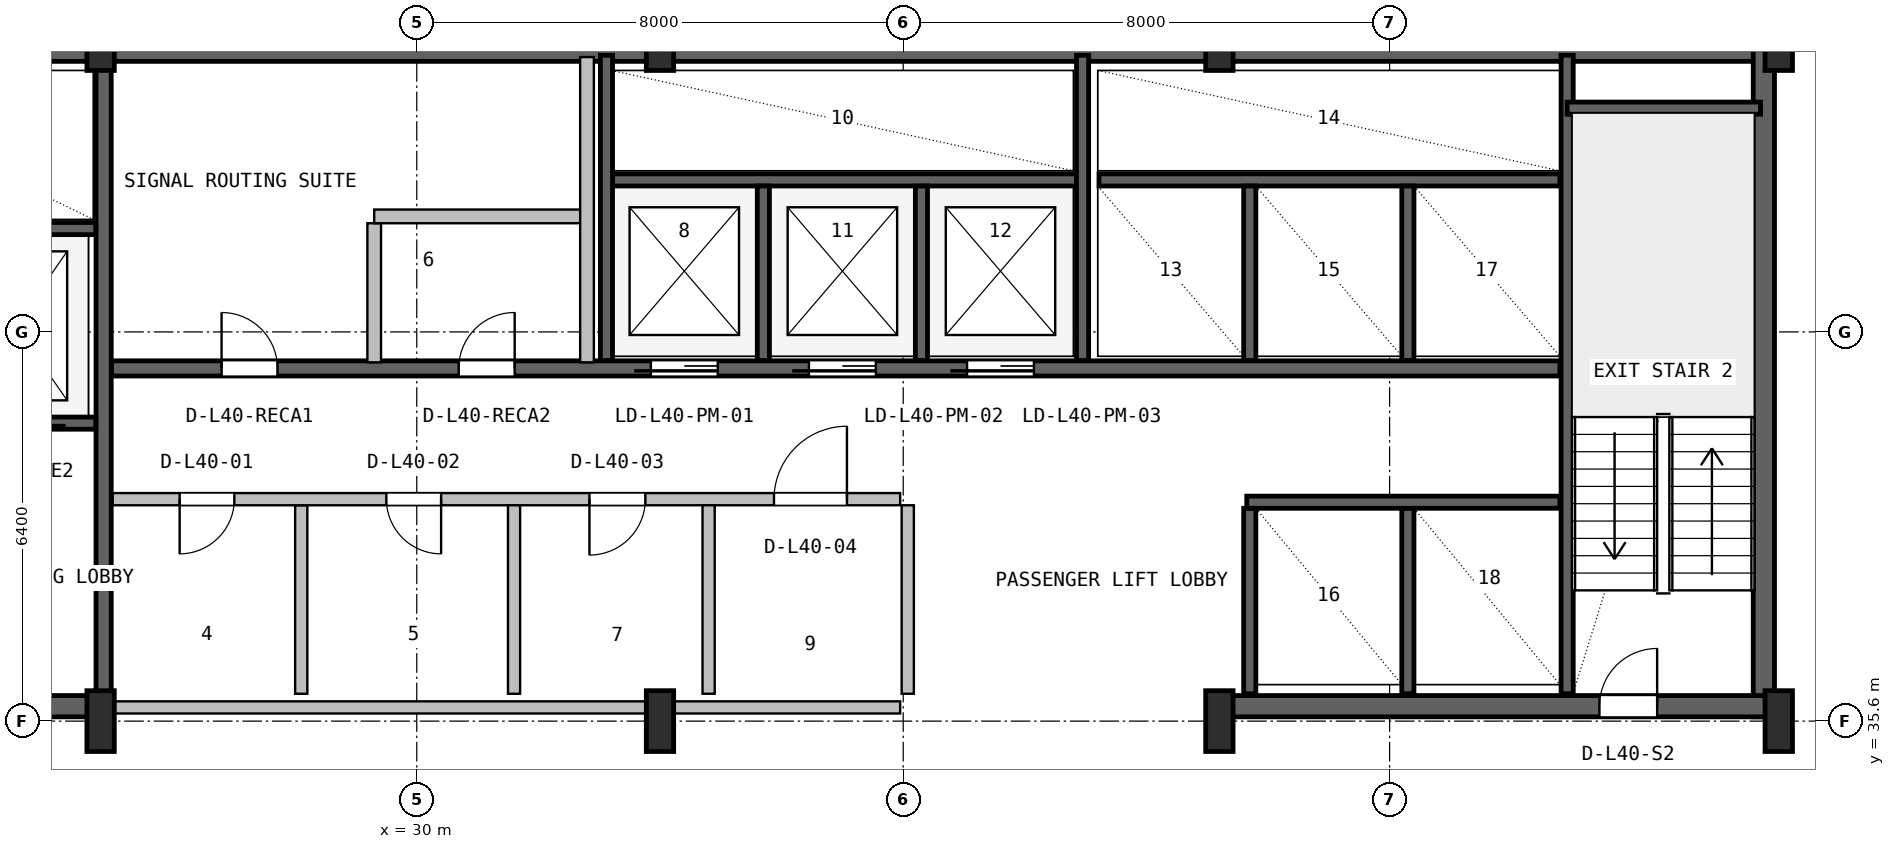
"""IFC4 building model, lengths in metres.
Left out: names, types, materials, properties, quantities, classifications, styles, units other than length and angle.
Written with IfcOpenShell. Run it as: python <this file> out.ifc"""

import sys

from ifc_helpers import new_model, si_unit, direction, frame, frame_2d, origin, origin_2d, place, context, subcontext, project, spatial, rectangle, i_section, extrude, source, transform, mapped, element, fill, save


model = new_model("IFC4")
c1 = context("Model", 3, precision=1e-05, world=origin(), true_north=direction((0.0, 1.0)))
c2 = subcontext(c1, "Body", "Model", "MODEL_VIEW")
j1 = project(units=[si_unit("LENGTHUNIT", "METRE"), si_unit("PLANEANGLEUNIT", "RADIAN")], contexts=[c1])
p1 = place(None, origin())
s1 = spatial("IfcSite", under=j1, at=p1, CompositionType="ELEMENT")
p2 = place(p1, origin())
s2 = spatial("IfcBuilding", under=s1, at=p2, CompositionType="ELEMENT")
p3 = place(p2, frame((0.0, 0.0, 164.8)))
s3 = spatial("IfcBuildingStorey", under=s2, at=p3, CompositionType="ELEMENT", Elevation=164.8)
p4 = place(p3, frame((15.6, 46.625, 0.0), z_axis=(0.0, 0.0, 1.0), x_axis=(1.0, 0.0, 0.0)))
e1 = element("IfcWall", 1, at=p4, inside=s3, PredefinedType="SHEAR", context=c2, shape_type="SweptSolid", body=[
    extrude(rectangle(XDim=36.8, YDim=0.35, at=frame_2d((18.4, 0.0))), origin(), (0.0, 0.0, 1.0), 3.55),
])
p5 = place(p3, frame((52.155, 35.67, 0.0), z_axis=(0.0, 0.0, 1.0), x_axis=(0.0, 1.0, 0.0)))
e2 = element("IfcWall", 2, at=p5, inside=s3, PredefinedType="SHEAR", context=c2, shape_type="SweptSolid", body=[
    extrude(rectangle(XDim=11.13, YDim=0.35, at=frame_2d((5.565, 0.0))), origin(), (0.0, 0.0, 1.0), 3.55),
])
p6 = place(p3, frame((15.67, 35.845, 0.0), z_axis=(0.0, 0.0, 1.0), x_axis=(1.0, 0.0, 0.0)))
e3 = element("IfcWall", 3, at=p6, inside=s3, PredefinedType="SHEAR", context=c2, shape_type="SweptSolid", body=[
    extrude(rectangle(XDim=9.13, YDim=0.35, at=frame_2d((4.565, 0.0))), origin(), (0.0, 0.0, 1.0), 3.55),
])
p7 = place(p6, frame((5.4, 0.0, 0.0)))
e4 = element("IfcOpeningElement", 4, at=p7, cuts=e3, PredefinedType="OPENING", context=c2, shape_type="SweptSolid", body=[
    extrude(rectangle(XDim=1.0, YDim=2.1, at=frame_2d((0.5, 1.05))), frame((0.0, 0.185, 0.0), z_axis=(0.0, -1.0, 0.0), x_axis=(1.0, 0.0, 0.0)), (0.0, 0.0, 1.0), 0.37),
])
p8 = place(p3, frame((43.2, 35.845, 0.0), z_axis=(0.0, 0.0, 1.0), x_axis=(1.0, 0.0, 0.0)))
e5 = element("IfcWall", 5, at=p8, inside=s3, PredefinedType="SHEAR", context=c2, shape_type="SweptSolid", body=[
    extrude(rectangle(XDim=9.13, YDim=0.35, at=frame_2d((4.565, 0.0))), origin(), (0.0, 0.0, 1.0), 3.55),
])
p9 = place(p8, frame((6.25, 0.0, 0.0)))
e6 = element("IfcOpeningElement", 6, at=p9, cuts=e5, PredefinedType="OPENING", context=c2, shape_type="SweptSolid", body=[
    extrude(rectangle(XDim=0.95, YDim=2.1, at=frame_2d((0.475, 1.05))), frame((0.0, 0.185, 0.0), z_axis=(0.0, -1.0, 0.0), x_axis=(1.0, 0.0, 0.0)), (0.0, 0.0, 1.0), 0.37),
])
m1 = source(origin(), c2, "Body", "SweptSolid", [
    extrude(i_section(OverallWidth=0.45, OverallDepth=1.0, WebThickness=0.016, FlangeThickness=0.03, FilletRadius=0.016, at=origin_2d()), origin(), (0.0, 0.0, 1.0), 3.8),
])
for number, where, z_axis, x_axis in (
    (7, (24.8, 35.6, 0.0), (0.0, 0.0, 1.0), (1.0, 0.0, 0.0)),
    (8, (24.8, 46.8, 0.0), (0.0, 0.0, 1.0), (1.0, 0.0, 0.0)),
    (9, (34.0, 35.6, 0.0), (0.0, 0.0, 1.0), (1.0, 0.0, 0.0)),
    (10, (34.0, 46.8, 0.0), (0.0, 0.0, 1.0), (1.0, 0.0, 0.0)),
    (11, (43.2, 35.6, 0.0), (0.0, 0.0, 1.0), (1.0, 0.0, 0.0)),
    (12, (43.2, 46.8, 0.0), (0.0, 0.0, 1.0), (1.0, 0.0, 0.0)),
    (13, (52.4, 35.6, 0.0), (0.0, 0.0, 1.0), (1.0, 0.0, 0.0)),
    (14, (52.4, 46.8, 0.0), (0.0, 0.0, 1.0), (1.0, 0.0, 0.0)),
):
    element("IfcColumn", number, at=place(p3, frame(where, z_axis=z_axis, x_axis=x_axis)), inside=s3, PredefinedType="COLUMN", context=c2, shape_type="MappedRepresentation", body=[
        mapped(m1, transform((0.0, 0.0, 0.0), x_axis=(1.0, 0.0, 0.0), y_axis=(0.0, 1.0, 0.0), z_axis=(0.0, 0.0, 1.0), scale=1.0)),
    ])
p10 = place(p3, frame((24.85, 36.05, 0.0), z_axis=(0.0, 0.0, 1.0), x_axis=(0.0, 1.0, 0.0)))
e15 = element("IfcWall", 15, at=p10, inside=s3, PredefinedType="SHEAR", context=c2, shape_type="SweptSolid", body=[
    extrude(rectangle(XDim=10.45, YDim=0.25, at=frame_2d((5.225, 0.0))), origin(), (0.0, 0.0, 1.0), 3.55),
])
p11 = place(p3, frame((19.2, 40.5, 0.0), z_axis=(0.0, 0.0, 1.0), x_axis=(1.0, 0.0, 0.0)))
e16 = element("IfcWall", 16, at=p11, inside=s3, PredefinedType="SHEAR", context=c2, shape_type="SweptSolid", body=[
    extrude(rectangle(XDim=5.52, YDim=0.2, at=frame_2d((2.76, 0.0))), origin(), (0.0, 0.0, 1.0), 3.55),
])
p12 = place(p11, frame((1.05, 0.0, 0.0)))
e17 = element("IfcOpeningElement", 17, at=p12, cuts=e16, PredefinedType="OPENING", context=c2, shape_type="SweptSolid", body=[
    extrude(rectangle(XDim=1.1, YDim=2.18, at=frame_2d((0.55, 1.09))), frame((0.0, 0.11, 0.0), z_axis=(0.0, -1.0, 0.0), x_axis=(1.0, 0.0, 0.0)), (0.0, 0.0, 1.0), 0.22),
])
p13 = place(p11, frame((3.65, 0.0, 0.0)))
e18 = element("IfcOpeningElement", 18, at=p13, cuts=e16, PredefinedType="OPENING", context=c2, shape_type="SweptSolid", body=[
    extrude(rectangle(XDim=1.1, YDim=2.18, at=frame_2d((0.55, 1.09))), frame((0.0, 0.11, 0.0), z_axis=(0.0, -1.0, 0.0), x_axis=(1.0, 0.0, 0.0)), (0.0, 0.0, 1.0), 0.22),
])
p14 = place(p3, frame((19.2, 43.7, 0.0), z_axis=(0.0, 0.0, 1.0), x_axis=(1.0, 0.0, 0.0)))
e19 = element("IfcWall", 19, at=p14, inside=s3, PredefinedType="SHEAR", context=c2, shape_type="SweptSolid", body=[
    extrude(rectangle(XDim=5.52, YDim=0.2, at=frame_2d((2.76, 0.0))), origin(), (0.0, 0.0, 1.0), 3.55),
])
p15 = place(p3, frame((48.92, 36.05, 0.0), z_axis=(0.0, 0.0, 1.0), x_axis=(0.0, 1.0, 0.0)))
e20 = element("IfcWall", 20, at=p15, inside=s3, PredefinedType="SHEAR", context=c2, shape_type="SweptSolid", body=[
    extrude(rectangle(XDim=10.5, YDim=0.2, at=frame_2d((5.25, 0.0))), origin(), (0.0, 0.0, 1.0), 3.55),
])
p16 = place(p3, frame((48.92, 45.68, 0.0), z_axis=(0.0, 0.0, 1.0), x_axis=(1.0, 0.0, 0.0)))
e21 = element("IfcWall", 21, at=p16, inside=s3, PredefinedType="SHEAR", context=c2, shape_type="SweptSolid", body=[
    extrude(rectangle(XDim=3.18, YDim=0.2, at=frame_2d((1.59, 0.0))), origin(), (0.0, 0.0, 1.0), 3.55),
])
p17 = place(p3, frame((24.98, 41.4, 0.0), z_axis=(0.0, 0.0, 1.0), x_axis=(1.0, 0.0, 0.0)))
e22 = element("IfcWall", 22, at=p17, inside=s3, PredefinedType="SHEAR", context=c2, shape_type="SweptSolid", body=[
    extrude(rectangle(XDim=23.82, YDim=0.25, at=frame_2d((11.91, 0.0))), origin(), (0.0, 0.0, 1.0), 3.55),
])
p18 = place(p17, frame((8.87, 0.0, 0.0)))
e23 = element("IfcOpeningElement", 23, at=p18, cuts=e22, PredefinedType="OPENING", context=c2, shape_type="SweptSolid", body=[
    extrude(rectangle(XDim=1.1, YDim=2.18, at=frame_2d((0.55, 1.09))), frame((0.0, 0.135, 0.0), z_axis=(0.0, -1.0, 0.0), x_axis=(1.0, 0.0, 0.0)), (0.0, 0.0, 1.0), 0.27),
])
p19 = place(p17, frame((11.47, 0.0, 0.0)))
e24 = element("IfcOpeningElement", 24, at=p19, cuts=e22, PredefinedType="OPENING", context=c2, shape_type="SweptSolid", body=[
    extrude(rectangle(XDim=1.1, YDim=2.18, at=frame_2d((0.55, 1.09))), frame((0.0, 0.135, 0.0), z_axis=(0.0, -1.0, 0.0), x_axis=(1.0, 0.0, 0.0)), (0.0, 0.0, 1.0), 0.27),
])
p20 = place(p17, frame((14.07, 0.0, 0.0)))
e25 = element("IfcOpeningElement", 25, at=p20, cuts=e22, PredefinedType="OPENING", context=c2, shape_type="SweptSolid", body=[
    extrude(rectangle(XDim=1.1, YDim=2.18, at=frame_2d((0.55, 1.09))), frame((0.0, 0.135, 0.0), z_axis=(0.0, -1.0, 0.0), x_axis=(1.0, 0.0, 0.0)), (0.0, 0.0, 1.0), 0.27),
])
p21 = place(p17, frame((1.81, 0.0, 0.0)))
e26 = element("IfcOpeningElement", 26, at=p21, cuts=e22, PredefinedType="OPENING", context=c2, shape_type="SweptSolid", body=[
    extrude(rectangle(XDim=0.92, YDim=2.08, at=frame_2d((0.46, 1.04))), frame((0.0, 0.135, 0.0), z_axis=(0.0, -1.0, 0.0), x_axis=(1.0, 0.0, 0.0)), (0.0, 0.0, 1.0), 0.27),
])
p22 = place(p17, frame((5.71, 0.0, 0.0)))
e27 = element("IfcOpeningElement", 27, at=p22, cuts=e22, PredefinedType="OPENING", context=c2, shape_type="SweptSolid", body=[
    extrude(rectangle(XDim=0.92, YDim=2.08, at=frame_2d((0.46, 1.04))), frame((0.0, 0.135, 0.0), z_axis=(0.0, -1.0, 0.0), x_axis=(1.0, 0.0, 0.0)), (0.0, 0.0, 1.0), 0.27),
])
p23 = place(p3, frame((33.22, 44.5, 0.0), z_axis=(0.0, 0.0, 1.0), x_axis=(1.0, 0.0, 0.0)))
e28 = element("IfcWall", 28, at=p23, inside=s3, PredefinedType="SHEAR", context=c2, shape_type="SweptSolid", body=[
    extrude(rectangle(XDim=7.63, YDim=0.2, at=frame_2d((3.815, 0.0))), origin(), (0.0, 0.0, 1.0), 3.55),
])
p24 = place(p3, frame((33.12, 41.53, 0.0), z_axis=(0.0, 0.0, 1.0), x_axis=(0.0, 1.0, 0.0)))
e29 = element("IfcWall", 29, at=p24, inside=s3, PredefinedType="SHEAR", context=c2, shape_type="SweptSolid", body=[
    extrude(rectangle(XDim=5.02, YDim=0.2, at=frame_2d((2.51, 0.0))), origin(), (0.0, 0.0, 1.0), 3.55),
])
for number, where, z_axis, x_axis in (
    (30, (35.7, 41.53, 0.0), (0.0, 0.0, 1.0), (0.0, 1.0, 0.0)),
    (31, (38.3, 41.53, 0.0), (0.0, 0.0, 1.0), (0.0, 1.0, 0.0)),
):
    element("IfcWall", number, at=place(p3, frame(where, z_axis=z_axis, x_axis=x_axis)), inside=s3, PredefinedType="SHEAR", context=c2, shape_type="SweptSolid", body=[
        extrude(rectangle(XDim=2.87, YDim=0.2, at=frame_2d((1.435, 0.0))), origin(), (0.0, 0.0, 1.0), 3.55),
    ])
p25 = place(p3, frame((40.95, 41.53, 0.0), z_axis=(0.0, 0.0, 1.0), x_axis=(0.0, 1.0, 0.0)))
e32 = element("IfcWall", 32, at=p25, inside=s3, PredefinedType="SHEAR", context=c2, shape_type="SweptSolid", body=[
    extrude(rectangle(XDim=5.02, YDim=0.2, at=frame_2d((2.51, 0.0))), origin(), (0.0, 0.0, 1.0), 3.55),
])
p26 = place(p3, frame((41.22, 44.5, 0.0), z_axis=(0.0, 0.0, 1.0), x_axis=(1.0, 0.0, 0.0)))
e33 = element("IfcWall", 33, at=p26, inside=s3, PredefinedType="SHEAR", context=c2, shape_type="SweptSolid", body=[
    extrude(rectangle(XDim=7.58, YDim=0.2, at=frame_2d((3.79, 0.0))), origin(), (0.0, 0.0, 1.0), 3.55),
])
for number, where, z_axis, x_axis in (
    (34, (43.7, 41.53, 0.0), (0.0, 0.0, 1.0), (0.0, 1.0, 0.0)),
    (35, (46.3, 41.53, 0.0), (0.0, 0.0, 1.0), (0.0, 1.0, 0.0)),
):
    element("IfcWall", number, at=place(p3, frame(where, z_axis=z_axis, x_axis=x_axis)), inside=s3, PredefinedType="SHEAR", context=c2, shape_type="SweptSolid", body=[
        extrude(rectangle(XDim=2.87, YDim=0.2, at=frame_2d((1.435, 0.0))), origin(), (0.0, 0.0, 1.0), 3.55),
    ])
for number, where, z_axis, x_axis in (
    (36, (43.7, 36.05, 0.0), (0.0, 0.0, 1.0), (0.0, 1.0, 0.0)),
    (37, (46.3, 36.05, 0.0), (0.0, 0.0, 1.0), (0.0, 1.0, 0.0)),
):
    element("IfcWall", number, at=place(p3, frame(where, z_axis=z_axis, x_axis=x_axis)), inside=s3, PredefinedType="SHEAR", context=c2, shape_type="SweptSolid", body=[
        extrude(rectangle(XDim=3.05, YDim=0.2, at=frame_2d((1.525, 0.0))), origin(), (0.0, 0.0, 1.0), 3.55),
    ])
p27 = place(p3, frame((43.65, 39.2, 0.0), z_axis=(0.0, 0.0, 1.0), x_axis=(1.0, 0.0, 0.0)))
e38 = element("IfcWall", 38, at=p27, inside=s3, PredefinedType="SHEAR", context=c2, shape_type="SweptSolid", body=[
    extrude(rectangle(XDim=5.15, YDim=0.2, at=frame_2d((2.575, 0.0))), origin(), (0.0, 0.0, 1.0), 3.55),
])
p28 = place(p3, frame((25.0, 35.825, 0.0), z_axis=(0.0, 0.0, 1.0), x_axis=(1.0, 0.0, 0.0)))
e39 = element("IfcWall", 39, at=p28, inside=s3, PredefinedType="SOLIDWALL", context=c2, shape_type="SweptSolid", body=[
    extrude(rectangle(XDim=12.95, YDim=0.2, at=frame_2d((6.475, 0.0))), origin(), (0.0, 0.0, 1.0), 2.575),
])
p29 = place(p3, frame((28.1, 36.05, 0.0), z_axis=(0.0, 0.0, 1.0), x_axis=(0.0, 1.0, 0.0)))
e40 = element("IfcWall", 40, at=p29, inside=s3, PredefinedType="PLUMBINGWALL", context=c2, shape_type="SweptSolid", body=[
    extrude(rectangle(XDim=3.1, YDim=0.2, at=frame_2d((1.55, 0.0))), origin(), (0.0, 0.0, 1.0), 3.53),
])
p30 = place(p3, frame((25.0, 39.25, 0.0), z_axis=(0.0, 0.0, 1.0), x_axis=(1.0, 0.0, 0.0)))
e41 = element("IfcWall", 41, at=p30, inside=s3, PredefinedType="SOLIDWALL", context=c2, shape_type="SweptSolid", body=[
    extrude(rectangle(XDim=12.95, YDim=0.2, at=frame_2d((6.475, 0.0))), origin(), (0.0, 0.0, 1.0), 3.53),
])
p31 = place(p30, frame((1.1, 0.0, 0.0)))
e42 = element("IfcOpeningElement", 42, at=p31, cuts=e41, PredefinedType="OPENING", context=c2, shape_type="SweptSolid", body=[
    extrude(rectangle(XDim=0.9, YDim=2.06, at=frame_2d((0.45, 1.03))), frame((0.0, 0.11, 0.0), z_axis=(0.0, -1.0, 0.0), x_axis=(1.0, 0.0, 0.0)), (0.0, 0.0, 1.0), 0.22),
])
p32 = place(p30, frame((4.5, 0.0, 0.0)))
e43 = element("IfcOpeningElement", 43, at=p32, cuts=e41, PredefinedType="OPENING", context=c2, shape_type="SweptSolid", body=[
    extrude(rectangle(XDim=0.9, YDim=2.06, at=frame_2d((0.45, 1.03))), frame((0.0, 0.11, 0.0), z_axis=(0.0, -1.0, 0.0), x_axis=(1.0, 0.0, 0.0)), (0.0, 0.0, 1.0), 0.22),
])
p33 = place(p30, frame((7.84, 0.0, 0.0)))
e44 = element("IfcOpeningElement", 44, at=p33, cuts=e41, PredefinedType="OPENING", context=c2, shape_type="SweptSolid", body=[
    extrude(rectangle(XDim=0.92, YDim=2.08, at=frame_2d((0.46, 1.04))), frame((0.0, 0.11, 0.0), z_axis=(0.0, -1.0, 0.0), x_axis=(1.0, 0.0, 0.0)), (0.0, 0.0, 1.0), 0.22),
])
p34 = place(p30, frame((10.875, 0.0, 0.0)))
e45 = element("IfcOpeningElement", 45, at=p34, cuts=e41, PredefinedType="OPENING", context=c2, shape_type="SweptSolid", body=[
    extrude(rectangle(XDim=1.2, YDim=2.1, at=frame_2d((0.6, 1.05))), frame((0.0, 0.11, 0.0), z_axis=(0.0, -1.0, 0.0), x_axis=(1.0, 0.0, 0.0)), (0.0, 0.0, 1.0), 0.22),
])
p35 = place(p3, frame((31.6, 36.05, 0.0), z_axis=(0.0, 0.0, 1.0), x_axis=(0.0, 1.0, 0.0)))
e46 = element("IfcWall", 46, at=p35, inside=s3, PredefinedType="PLUMBINGWALL", context=c2, shape_type="SweptSolid", body=[
    extrude(rectangle(XDim=3.1, YDim=0.2, at=frame_2d((1.55, 0.0))), origin(), (0.0, 0.0, 1.0), 3.53),
])
for number, where, z_axis, x_axis in (
    (47, (34.8, 36.05, 0.0), (0.0, 0.0, 1.0), (0.0, 1.0, 0.0)),
    (48, (38.075, 36.05, 0.0), (0.0, 0.0, 1.0), (0.0, 1.0, 0.0)),
):
    element("IfcWall", number, at=place(p3, frame(where, z_axis=z_axis, x_axis=x_axis)), inside=s3, PredefinedType="SOLIDWALL", context=c2, shape_type="SweptSolid", body=[
        extrude(rectangle(XDim=3.1, YDim=0.2, at=frame_2d((1.55, 0.0))), origin(), (0.0, 0.0, 1.0), 3.53),
    ])
p36 = place(p3, frame((29.3, 41.5, 0.0), z_axis=(0.0, 0.0, 1.0), x_axis=(0.0, 1.0, 0.0)))
e49 = element("IfcWall", 49, at=p36, inside=s3, PredefinedType="PARTITIONING", context=c2, shape_type="SweptSolid", body=[
    extrude(rectangle(XDim=2.288, YDim=0.225, at=frame_2d((1.144, 0.0))), origin(), (0.0, 0.0, 1.0), 3.53),
])
p37 = place(p3, frame((29.3, 43.9, 0.0), z_axis=(0.0, 0.0, 1.0), x_axis=(1.0, 0.0, 0.0)))
e50 = element("IfcWall", 50, at=p37, inside=s3, PredefinedType="PARTITIONING", context=c2, shape_type="SweptSolid", body=[
    extrude(rectangle(XDim=3.5, YDim=0.225, at=frame_2d((1.75, 0.0))), origin(), (0.0, 0.0, 1.0), 3.53),
])
p38 = place(p3, frame((32.8, 41.5, 0.0), z_axis=(0.0, 0.0, 1.0), x_axis=(0.0, 1.0, 0.0)))
e51 = element("IfcWall", 51, at=p38, inside=s3, PredefinedType="PARTITIONING", context=c2, shape_type="SweptSolid", body=[
    extrude(rectangle(XDim=5.02, YDim=0.225, at=frame_2d((2.51, 0.0))), origin(), (0.0, 0.0, 1.0), 3.53),
])
m2 = source(origin(), c2, "Body", "SweptSolid", [
    extrude(rectangle(XDim=0.95, YDim=2.1, at=frame_2d((0.475, 1.05))), frame((0.0, 0.025, 0.0), z_axis=(0.0, -1.0, 0.0), x_axis=(1.0, 0.0, 0.0)), (0.0, 0.0, 1.0), 0.05),
])
p39 = place(p9, origin())
e52 = element("IfcDoor", 52, at=p39, inside=s3, OperationType="SINGLE_SWING_RIGHT", PredefinedType="DOOR", context=c2, shape_type="MappedRepresentation", body=[
    mapped(m2, transform((0.0, 0.0, 0.0), x_axis=(1.0, 0.0, 0.0), y_axis=(0.0, 1.0, 0.0), z_axis=(0.0, 0.0, 1.0), scale=1.0)),
])
fill(e6, e52)
m3 = source(origin(), c2, "Body", "SweptSolid", [
    extrude(rectangle(XDim=1.1, YDim=2.18, at=frame_2d((0.55, 1.09))), frame((0.0, 0.025, 0.0), z_axis=(0.0, -1.0, 0.0), x_axis=(1.0, 0.0, 0.0)), (0.0, 0.0, 1.0), 0.05),
])
p40 = place(p18, frame((1.1, 0.0, 0.0), z_axis=(0.0, 0.0, 1.0), x_axis=(-1.0, 0.0, 0.0)))
e53 = element("IfcDoor", 53, at=p40, inside=s3, OperationType="SLIDING_TO_LEFT", PredefinedType="DOOR", context=c2, shape_type="MappedRepresentation", body=[
    mapped(m3, transform((0.0, 0.0, 0.0), x_axis=(1.0, 0.0, 0.0), y_axis=(0.0, 1.0, 0.0), z_axis=(0.0, 0.0, 1.0), scale=1.0)),
])
fill(e23, e53)
p41 = place(p19, frame((1.1, 0.0, 0.0), z_axis=(0.0, 0.0, 1.0), x_axis=(-1.0, 0.0, 0.0)))
e54 = element("IfcDoor", 54, at=p41, inside=s3, OperationType="SLIDING_TO_LEFT", PredefinedType="DOOR", context=c2, shape_type="MappedRepresentation", body=[
    mapped(m3, transform((0.0, 0.0, 0.0), x_axis=(1.0, 0.0, 0.0), y_axis=(0.0, 1.0, 0.0), z_axis=(0.0, 0.0, 1.0), scale=1.0)),
])
fill(e24, e54)
p42 = place(p20, frame((1.1, 0.0, 0.0), z_axis=(0.0, 0.0, 1.0), x_axis=(-1.0, 0.0, 0.0)))
e55 = element("IfcDoor", 55, at=p42, inside=s3, OperationType="SLIDING_TO_LEFT", PredefinedType="DOOR", context=c2, shape_type="MappedRepresentation", body=[
    mapped(m3, transform((0.0, 0.0, 0.0), x_axis=(1.0, 0.0, 0.0), y_axis=(0.0, 1.0, 0.0), z_axis=(0.0, 0.0, 1.0), scale=1.0)),
])
fill(e25, e55)
m4 = source(origin(), c2, "Body", "SweptSolid", [
    extrude(rectangle(XDim=0.92, YDim=2.08, at=frame_2d((0.46, 1.04))), frame((0.0, 0.025, 0.0), z_axis=(0.0, -1.0, 0.0), x_axis=(1.0, 0.0, 0.0)), (0.0, 0.0, 1.0), 0.05),
])
p43 = place(p21, origin())
e56 = element("IfcDoor", 56, at=p43, inside=s3, OperationType="SINGLE_SWING_LEFT", PredefinedType="DOOR", context=c2, shape_type="MappedRepresentation", body=[
    mapped(m4, transform((0.0, 0.0, 0.0), x_axis=(1.0, 0.0, 0.0), y_axis=(0.0, 1.0, 0.0), z_axis=(0.0, 0.0, 1.0), scale=1.0)),
])
fill(e26, e56)
p44 = place(p22, origin())
e57 = element("IfcDoor", 57, at=p44, inside=s3, OperationType="SINGLE_SWING_RIGHT", PredefinedType="DOOR", context=c2, shape_type="MappedRepresentation", body=[
    mapped(m4, transform((0.0, 0.0, 0.0), x_axis=(1.0, 0.0, 0.0), y_axis=(0.0, 1.0, 0.0), z_axis=(0.0, 0.0, 1.0), scale=1.0)),
])
fill(e27, e57)
m5 = source(origin(), c2, "Body", "SweptSolid", [
    extrude(rectangle(XDim=0.9, YDim=2.06, at=frame_2d((0.45, 1.03))), frame((0.0, 0.025, 0.0), z_axis=(0.0, -1.0, 0.0), x_axis=(1.0, 0.0, 0.0)), (0.0, 0.0, 1.0), 0.05),
])
p45 = place(p31, frame((0.9, 0.0, 0.0), z_axis=(0.0, 0.0, 1.0), x_axis=(-1.0, 0.0, 0.0)))
e58 = element("IfcDoor", 58, at=p45, inside=s3, OperationType="SINGLE_SWING_LEFT", PredefinedType="DOOR", context=c2, shape_type="MappedRepresentation", body=[
    mapped(m5, transform((0.0, 0.0, 0.0), x_axis=(1.0, 0.0, 0.0), y_axis=(0.0, 1.0, 0.0), z_axis=(0.0, 0.0, 1.0), scale=1.0)),
])
fill(e42, e58)
p46 = place(p32, frame((0.9, 0.0, 0.0), z_axis=(0.0, 0.0, 1.0), x_axis=(-1.0, 0.0, 0.0)))
e59 = element("IfcDoor", 59, at=p46, inside=s3, OperationType="SINGLE_SWING_RIGHT", PredefinedType="DOOR", context=c2, shape_type="MappedRepresentation", body=[
    mapped(m5, transform((0.0, 0.0, 0.0), x_axis=(1.0, 0.0, 0.0), y_axis=(0.0, 1.0, 0.0), z_axis=(0.0, 0.0, 1.0), scale=1.0)),
])
fill(e43, e59)
p47 = place(p33, frame((0.92, 0.0, 0.0), z_axis=(0.0, 0.0, 1.0), x_axis=(-1.0, 0.0, 0.0)))
e60 = element("IfcDoor", 60, at=p47, inside=s3, OperationType="SINGLE_SWING_LEFT", PredefinedType="DOOR", context=c2, shape_type="MappedRepresentation", body=[
    mapped(m4, transform((0.0, 0.0, 0.0), x_axis=(1.0, 0.0, 0.0), y_axis=(0.0, 1.0, 0.0), z_axis=(0.0, 0.0, 1.0), scale=1.0)),
])
fill(e44, e60)
m6 = source(origin(), c2, "Body", "SweptSolid", [
    extrude(rectangle(XDim=1.2, YDim=2.1, at=frame_2d((0.6, 1.05))), frame((0.0, 0.025, 0.0), z_axis=(0.0, -1.0, 0.0), x_axis=(1.0, 0.0, 0.0)), (0.0, 0.0, 1.0), 0.05),
])
p48 = place(p34, origin())
e61 = element("IfcDoor", 61, at=p48, inside=s3, OperationType="SINGLE_SWING_RIGHT", PredefinedType="DOOR", context=c2, shape_type="MappedRepresentation", body=[
    mapped(m6, transform((0.0, 0.0, 0.0), x_axis=(1.0, 0.0, 0.0), y_axis=(0.0, 1.0, 0.0), z_axis=(0.0, 0.0, 1.0), scale=1.0)),
])
fill(e45, e61)
save(model, sys.argv[1])
